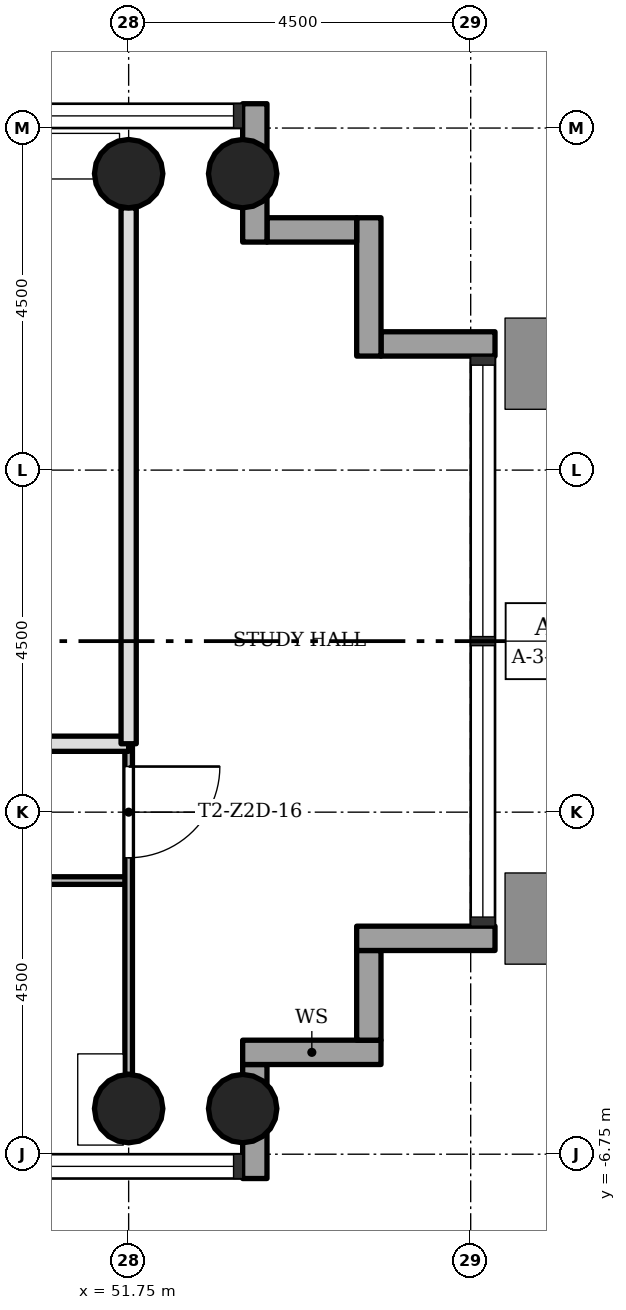
"""IFC4 building model, lengths in metres.
Left out: names, types, materials, properties, quantities, classifications, styles, units other than length and angle.
Written with IfcOpenShell. Run it as: python <this file> out.ifc"""

import sys

from ifc_helpers import new_model, si_unit, direction, frame, frame_2d, origin, origin_2d, place, context, subcontext, project, spatial, rectangle, hollow_circle, extrude, element, fill, save


model = new_model("IFC4")
c1 = context("Model", 3, precision=1e-05, world=origin(), true_north=direction((0.0, 1.0)))
c2 = subcontext(c1, "Body", "Model", "MODEL_VIEW")
j1 = project(units=[si_unit("LENGTHUNIT", "METRE"), si_unit("PLANEANGLEUNIT", "RADIAN")], contexts=[c1])
p1 = place(None, origin())
s1 = spatial("IfcSite", under=j1, at=p1, CompositionType="ELEMENT")
p2 = place(p1, origin())
s2 = spatial("IfcBuilding", under=s1, at=p2, CompositionType="ELEMENT")
p3 = place(p2, frame((0.0, 0.0, 120.8)))
s3 = spatial("IfcBuildingStorey", under=s2, at=p3, CompositionType="ELEMENT", Elevation=120.8)
for number, where, z_axis, x_axis in (
    (1, (51.75, -6.15, 0.0), (0.0, 0.0, 1.0), (1.0, 0.0, 0.0)),
    (2, (51.75, 6.15, 0.0), (0.0, 0.0, 1.0), (1.0, 0.0, 0.0)),
    (3, (53.25, -6.15, 0.0), (0.0, 0.0, 1.0), (1.0, 0.0, 0.0)),
    (4, (53.25, 6.15, 0.0), (0.0, 0.0, 1.0), (1.0, 0.0, 0.0)),
):
    element("IfcColumn", number, at=place(p3, frame(where, z_axis=z_axis, x_axis=x_axis)), inside=s3, PredefinedType="COLUMN", context=c2, shape_type="SweptSolid", body=[
        extrude(hollow_circle(Radius=0.45, WallThickness=0.032, at=origin_2d()), origin(), (0.0, 0.0, 1.0), 3.4),
    ])
p4 = place(p3, frame((53.41, -7.07, -0.3), z_axis=(0.0, 0.0, 1.0), x_axis=(0.0, 1.0, 0.0)))
e5 = element("IfcWall", 5, at=p4, inside=s3, PredefinedType="STANDARD", context=c2, shape_type="SweptSolid", body=[
    extrude(rectangle(XDim=1.5, YDim=0.32, at=frame_2d((0.75, 0.0))), origin(), (0.0, 0.0, 1.0), 3.4),
])
p5 = place(p3, frame((53.25, -5.41, -0.3), z_axis=(0.0, 0.0, 1.0), x_axis=(1.0, 0.0, 0.0)))
e6 = element("IfcWall", 6, at=p5, inside=s3, PredefinedType="STANDARD", context=c2, shape_type="SweptSolid", body=[
    extrude(rectangle(XDim=1.82, YDim=0.32, at=frame_2d((0.91, 0.0))), origin(), (0.0, 0.0, 1.0), 3.4),
])
p6 = place(p3, frame((54.91, -5.25, -0.3), z_axis=(0.0, 0.0, 1.0), x_axis=(0.0, 1.0, 0.0)))
e7 = element("IfcWall", 7, at=p6, inside=s3, PredefinedType="STANDARD", context=c2, shape_type="SweptSolid", body=[
    extrude(rectangle(XDim=1.18, YDim=0.32, at=frame_2d((0.59, 0.0))), origin(), (0.0, 0.0, 1.0), 3.4),
])
p7 = place(p3, frame((54.75, -3.91, -0.3), z_axis=(0.0, 0.0, 1.0), x_axis=(1.0, 0.0, 0.0)))
e8 = element("IfcWall", 8, at=p7, inside=s3, PredefinedType="STANDARD", context=c2, shape_type="SweptSolid", body=[
    extrude(rectangle(XDim=1.82, YDim=0.32, at=frame_2d((0.91, 0.0))), origin(), (0.0, 0.0, 1.0), 3.4),
])
p8 = place(p3, frame((56.57, 3.91, -0.3), z_axis=(0.0, 0.0, 1.0), x_axis=(-1.0, 0.0, 0.0)))
e9 = element("IfcWall", 9, at=p8, inside=s3, PredefinedType="STANDARD", context=c2, shape_type="SweptSolid", body=[
    extrude(rectangle(XDim=1.5, YDim=0.32, at=frame_2d((0.75, 0.0))), origin(), (0.0, 0.0, 1.0), 3.4),
])
p9 = place(p3, frame((54.91, 3.75, -0.3), z_axis=(0.0, 0.0, 1.0), x_axis=(0.0, 1.0, 0.0)))
e10 = element("IfcWall", 10, at=p9, inside=s3, PredefinedType="STANDARD", context=c2, shape_type="SweptSolid", body=[
    extrude(rectangle(XDim=1.82, YDim=0.32, at=frame_2d((0.91, 0.0))), origin(), (0.0, 0.0, 1.0), 3.4),
])
p10 = place(p3, frame((54.75, 5.41, -0.3), z_axis=(0.0, 0.0, 1.0), x_axis=(-1.0, 0.0, 0.0)))
e11 = element("IfcWall", 11, at=p10, inside=s3, PredefinedType="STANDARD", context=c2, shape_type="SweptSolid", body=[
    extrude(rectangle(XDim=1.18, YDim=0.32, at=frame_2d((0.59, 0.0))), origin(), (0.0, 0.0, 1.0), 3.4),
])
p11 = place(p3, frame((53.41, 5.25, -0.3), z_axis=(0.0, 0.0, 1.0), x_axis=(0.0, 1.0, 0.0)))
e12 = element("IfcWall", 12, at=p11, inside=s3, PredefinedType="STANDARD", context=c2, shape_type="SweptSolid", body=[
    extrude(rectangle(XDim=1.82, YDim=0.32, at=frame_2d((0.91, 0.0))), origin(), (0.0, 0.0, 1.0), 3.4),
])
p12 = place(p3, frame((51.75, -3.15, 0.0), z_axis=(0.0, 0.0, 1.0), x_axis=(-1.0, 0.0, 0.0)))
e13 = element("IfcWall", 13, at=p12, inside=s3, PredefinedType="PARTITIONING", context=c2, shape_type="SweptSolid", body=[
    extrude(rectangle(XDim=9.0, YDim=0.1, at=frame_2d((4.5, 0.0))), origin(), (0.0, 0.0, 1.0), 3.0),
])
p13 = place(p12, frame((5.55, 0.0, 0.0)))
e14 = element("IfcOpeningElement", 14, at=p13, cuts=e13, PredefinedType="OPENING", context=c2, shape_type="SweptSolid", body=[
    extrude(rectangle(XDim=0.9, YDim=2.1, at=frame_2d((0.45, 1.05))), frame((0.0, 0.06, 0.0), z_axis=(0.0, -1.0, 0.0), x_axis=(1.0, 0.0, 0.0)), (0.0, 0.0, 1.0), 0.12),
])
p14 = place(p3, frame((51.75, -1.35, 0.0), z_axis=(0.0, 0.0, 1.0), x_axis=(-1.0, 0.0, 0.0)))
e15 = element("IfcWall", 15, at=p14, inside=s3, PredefinedType="SOLIDWALL", context=c2, shape_type="SweptSolid", body=[
    extrude(rectangle(XDim=7.2, YDim=0.2, at=frame_2d((3.6, 0.0))), origin(), (0.0, 0.0, 1.0), 3.0),
])
p15 = place(p14, frame((1.95, 0.0, 0.0)))
e16 = element("IfcOpeningElement", 16, at=p15, cuts=e15, PredefinedType="OPENING", context=c2, shape_type="SweptSolid", body=[
    extrude(rectangle(XDim=0.9, YDim=2.1, at=frame_2d((0.45, 1.05))), frame((0.0, 0.11, 0.0), z_axis=(0.0, -1.0, 0.0), x_axis=(1.0, 0.0, 0.0)), (0.0, 0.0, 1.0), 0.22),
])
p16 = place(p3, frame((51.75, -5.7, 0.0), z_axis=(0.0, 0.0, 1.0), x_axis=(0.0, 1.0, 0.0)))
e17 = element("IfcWall", 17, at=p16, inside=s3, PredefinedType="PARTITIONING", context=c2, shape_type="SweptSolid", body=[
    extrude(rectangle(XDim=4.35, YDim=0.1, at=frame_2d((2.175, 0.0))), origin(), (0.0, 0.0, 1.0), 3.0),
])
p17 = place(p16, frame((2.85, 0.0, 0.0)))
e18 = element("IfcOpeningElement", 18, at=p17, cuts=e17, PredefinedType="OPENING", context=c2, shape_type="SweptSolid", body=[
    extrude(rectangle(XDim=1.2, YDim=2.1, at=frame_2d((0.6, 1.05))), frame((0.0, 0.06, 0.0), z_axis=(0.0, -1.0, 0.0), x_axis=(1.0, 0.0, 0.0)), (0.0, 0.0, 1.0), 0.12),
])
p18 = place(p3, frame((51.75, -1.35, 0.0), z_axis=(0.0, 0.0, 1.0), x_axis=(0.0, 1.0, 0.0)))
e19 = element("IfcWall", 19, at=p18, inside=s3, PredefinedType="SOLIDWALL", context=c2, shape_type="SweptSolid", body=[
    extrude(rectangle(XDim=7.05, YDim=0.2, at=frame_2d((3.525, 0.0))), origin(), (0.0, 0.0, 1.0), 3.0),
])
p19 = place(p17, origin())
e20 = element("IfcDoor", 20, at=p19, inside=s3, OperationType="SINGLE_SWING_RIGHT", PredefinedType="DOOR", context=c2, shape_type="SweptSolid", body=[
    extrude(rectangle(XDim=1.2, YDim=2.1, at=frame_2d((0.6, 1.05))), frame((0.0, 0.025, 0.0), z_axis=(0.0, -1.0, 0.0), x_axis=(1.0, 0.0, 0.0)), (0.0, 0.0, 1.0), 0.05),
])
fill(e18, e20)
save(model, sys.argv[1])
